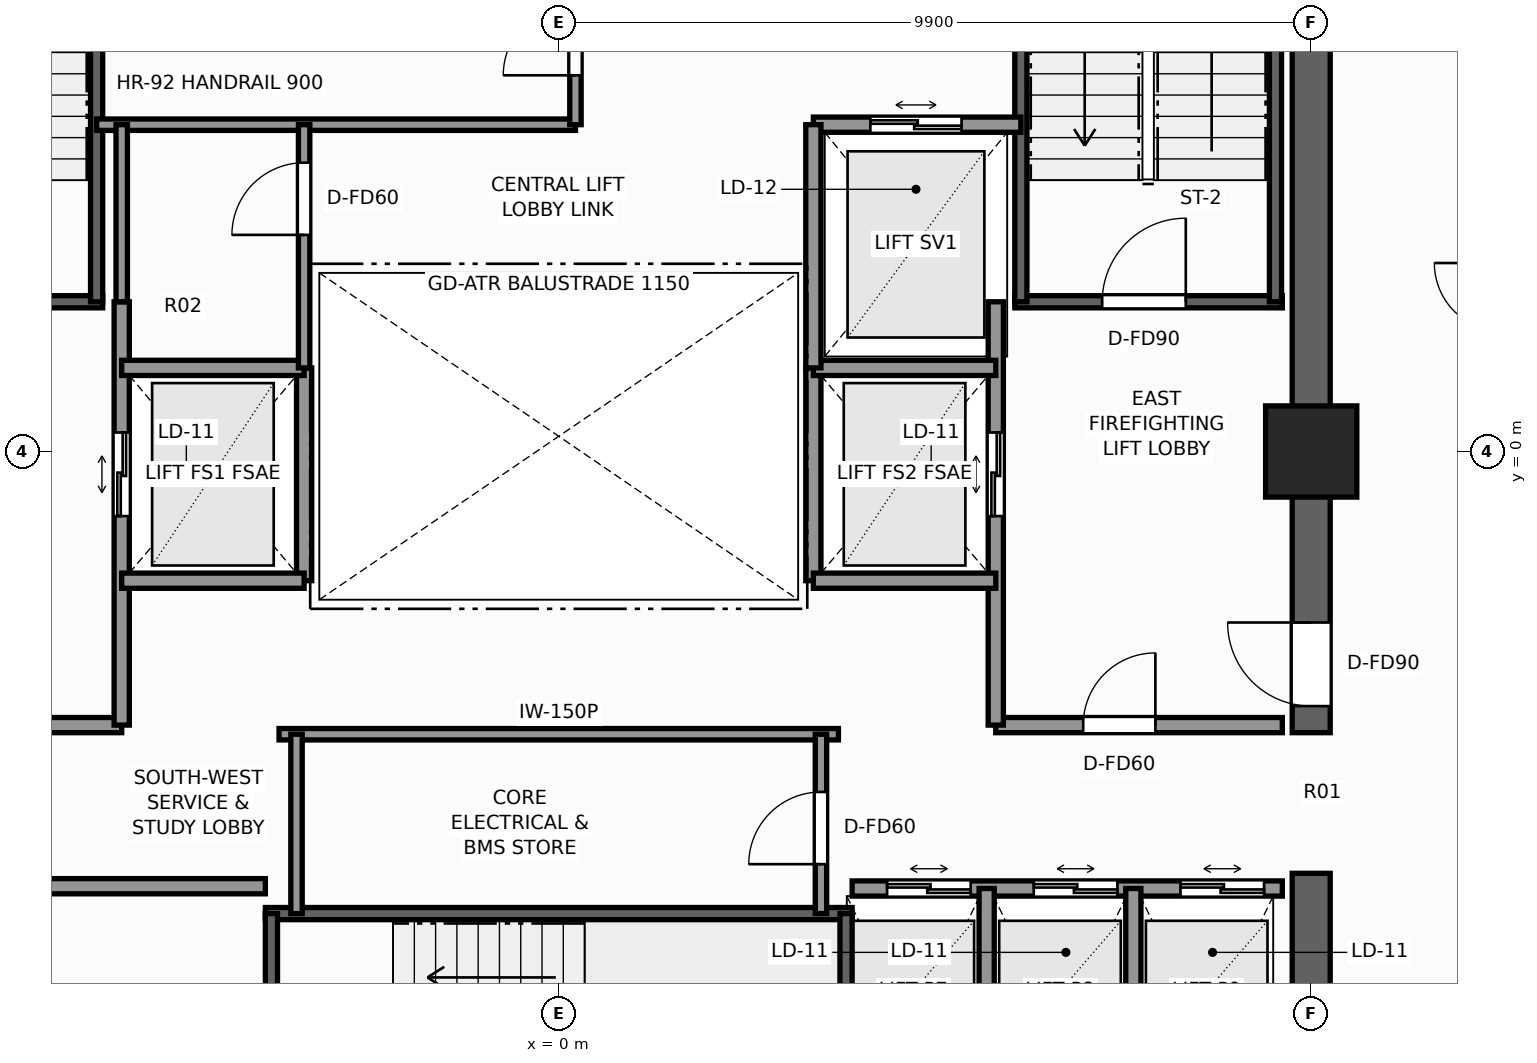
"""IFC4 building model, lengths in metres.
Left out: names, types, materials, properties, quantities, classifications, styles, units other than length and angle.
Written with IfcOpenShell. Run it as: python <this file> out.ifc"""

import sys

from ifc_helpers import new_model, si_unit, direction, frame, frame_2d, origin, origin_2d, place, context, subcontext, project, spatial, rectangle, extrude, element, fill, save


model = new_model("IFC4")
c1 = context("Model", 3, precision=1e-05, world=origin(), true_north=direction((0.0, 1.0)))
c2 = subcontext(c1, "Body", "Model", "MODEL_VIEW")
j1 = project(units=[si_unit("LENGTHUNIT", "METRE"), si_unit("PLANEANGLEUNIT", "RADIAN")], contexts=[c1])
p1 = place(None, origin())
s1 = spatial("IfcSite", under=j1, at=p1, CompositionType="ELEMENT")
p2 = place(p1, origin())
s2 = spatial("IfcBuilding", under=s1, at=p2, CompositionType="ELEMENT")
p3 = place(p2, frame((0.0, 0.0, 163.5)))
s3 = spatial("IfcBuildingStorey", under=s2, at=p3, CompositionType="ELEMENT", Elevation=163.5)
p4 = place(p3, frame((9.9, -9.65, 0.0), z_axis=(0.0, 0.0, 1.0), x_axis=(0.0, 1.0, 0.0)))
e1 = element("IfcWall", 1, at=p4, inside=s3, PredefinedType="SHEAR", context=c2, shape_type="SweptSolid", body=[
    extrude(rectangle(XDim=4.1, YDim=0.5, at=frame_2d((2.05, 0.0))), origin(), (0.0, 0.0, 1.0), 3.3),
])
p5 = place(p3, frame((9.9, -3.7, 0.0), z_axis=(0.0, 0.0, 1.0), x_axis=(0.0, 1.0, 0.0)))
e2 = element("IfcWall", 2, at=p5, inside=s3, PredefinedType="SHEAR", context=c2, shape_type="SweptSolid", body=[
    extrude(rectangle(XDim=13.35, YDim=0.5, at=frame_2d((6.675, 0.0))), origin(), (0.0, 0.0, 1.0), 3.3),
])
p6 = place(p5, frame((0.35, 0.0, 0.0)))
e3 = element("IfcOpeningElement", 3, at=p6, cuts=e2, PredefinedType="OPENING", context=c2, shape_type="SweptSolid", body=[
    extrude(rectangle(XDim=1.1, YDim=2.2, at=frame_2d((0.55, 1.1))), frame((0.0, 0.26, 0.0), z_axis=(0.0, -1.0, 0.0), x_axis=(1.0, 0.0, 0.0)), (0.0, 0.0, 1.0), 0.52),
])
p7 = place(p3, frame((9.9, 0.0, 0.0), z_axis=(0.0, 0.0, 1.0), x_axis=(1.0, 0.0, 0.0)))
e4 = element("IfcColumn", 4, at=p7, inside=s3, PredefinedType="COLUMN", context=c2, shape_type="SweptSolid", body=[
    extrude(rectangle(XDim=1.2, YDim=1.2, at=origin_2d()), origin(), (0.0, 0.0, 1.0), 3.3),
])
p8 = place(p3, frame((-9.52, 1.97, 0.0), z_axis=(0.0, 0.0, 1.0), x_axis=(1.0, 0.0, 0.0)))
e5 = element("IfcWall", 5, at=p8, inside=s3, PredefinedType="SHEAR", context=c2, shape_type="SweptSolid", body=[
    extrude(rectangle(XDim=3.52, YDim=0.16, at=frame_2d((1.76, 0.0))), origin(), (0.0, 0.0, 1.0), 3.3),
])
p9 = place(p8, frame((1.15, 0.0, 0.0)))
e6 = element("IfcOpeningElement", 6, at=p9, cuts=e5, PredefinedType="OPENING", context=c2, shape_type="SweptSolid", body=[
    extrude(rectangle(XDim=1.1, YDim=2.2, at=frame_2d((0.55, 1.1))), frame((0.0, 0.09, 0.0), z_axis=(0.0, -1.0, 0.0), x_axis=(1.0, 0.0, 0.0)), (0.0, 0.0, 1.0), 0.18),
])
p10 = place(p3, frame((-6.08, 1.97, 0.0), z_axis=(0.0, 0.0, 1.0), x_axis=(0.0, 1.0, 0.0)))
e7 = element("IfcWall", 7, at=p10, inside=s3, PredefinedType="SHEAR", context=c2, shape_type="SweptSolid", body=[
    extrude(rectangle(XDim=7.56, YDim=0.16, at=frame_2d((3.78, 0.0))), origin(), (0.0, 0.0, 1.0), 3.3),
])
p11 = place(p3, frame((6.0, 1.97, 0.0), z_axis=(0.0, 0.0, 1.0), x_axis=(1.0, 0.0, 0.0)))
e8 = element("IfcWall", 8, at=p11, inside=s3, PredefinedType="SHEAR", context=c2, shape_type="SweptSolid", body=[
    extrude(rectangle(XDim=3.52, YDim=0.16, at=frame_2d((1.76, 0.0))), origin(), (0.0, 0.0, 1.0), 3.3),
])
p12 = place(p11, frame((1.15, 0.0, 0.0)))
e9 = element("IfcOpeningElement", 9, at=p12, cuts=e8, PredefinedType="OPENING", context=c2, shape_type="SweptSolid", body=[
    extrude(rectangle(XDim=1.1, YDim=2.2, at=frame_2d((0.55, 1.1))), frame((0.0, 0.09, 0.0), z_axis=(0.0, -1.0, 0.0), x_axis=(1.0, 0.0, 0.0)), (0.0, 0.0, 1.0), 0.18),
])
for number, where, z_axis, x_axis in (
    (10, (6.08, 1.97, 0.0), (0.0, 0.0, 1.0), (0.0, 1.0, 0.0)),
    (11, (9.43, 1.97, 0.0), (0.0, 0.0, 1.0), (0.0, 1.0, 0.0)),
):
    element("IfcWall", number, at=place(p3, frame(where, z_axis=z_axis, x_axis=x_axis)), inside=s3, PredefinedType="SHEAR", context=c2, shape_type="SweptSolid", body=[
        extrude(rectangle(XDim=7.56, YDim=0.16, at=frame_2d((3.78, 0.0))), origin(), (0.0, 0.0, 1.0), 3.3),
    ])
p13 = place(p3, frame((-3.86, -6.08, 0.0), z_axis=(0.0, 0.0, 1.0), x_axis=(1.0, 0.0, 0.0)))
e12 = element("IfcWall", 12, at=p13, inside=s3, PredefinedType="SHEAR", context=c2, shape_type="SweptSolid", body=[
    extrude(rectangle(XDim=7.72, YDim=0.16, at=frame_2d((3.86, 0.0))), origin(), (0.0, 0.0, 1.0), 3.3),
])
for number, where, z_axis, x_axis in (
    (13, (-3.78, -9.43, 0.0), (0.0, 0.0, 1.0), (0.0, 1.0, 0.0)),
    (14, (3.78, -9.43, 0.0), (0.0, 0.0, 1.0), (0.0, 1.0, 0.0)),
):
    element("IfcWall", number, at=place(p3, frame(where, z_axis=z_axis, x_axis=x_axis)), inside=s3, PredefinedType="SHEAR", context=c2, shape_type="SweptSolid", body=[
        extrude(rectangle(XDim=3.35, YDim=0.16, at=frame_2d((1.675, 0.0))), origin(), (0.0, 0.0, 1.0), 3.3),
    ])
p14 = place(p3, frame((-9.52, -3.6, 0.0), z_axis=(0.0, 0.0, 1.0), x_axis=(1.0, 0.0, 0.0)))
e15 = element("IfcWall", 15, at=p14, inside=s3, PredefinedType="SOLIDWALL", context=c2, shape_type="SweptSolid", body=[
    extrude(rectangle(XDim=3.77, YDim=0.2, at=frame_2d((1.885, 0.0))), origin(), (0.0, 0.0, 1.0), 3.1),
])
p15 = place(p14, frame((1.15, 0.0, 0.0)))
e16 = element("IfcOpeningElement", 16, at=p15, cuts=e15, PredefinedType="OPENING", context=c2, shape_type="SweptSolid", body=[
    extrude(rectangle(XDim=0.95, YDim=2.06, at=frame_2d((0.475, 1.03))), frame((0.0, 0.11, 0.0), z_axis=(0.0, -1.0, 0.0), x_axis=(1.0, 0.0, 0.0)), (0.0, 0.0, 1.0), 0.22),
])
p16 = place(p3, frame((-5.75, -3.6, 0.0), z_axis=(0.0, 0.0, 1.0), x_axis=(0.0, 1.0, 0.0)))
e17 = element("IfcWall", 17, at=p16, inside=s3, PredefinedType="SOLIDWALL", context=c2, shape_type="SweptSolid", body=[
    extrude(rectangle(XDim=5.57, YDim=0.2, at=frame_2d((2.785, 0.0))), origin(), (0.0, 0.0, 1.0), 2.735),
])
p17 = place(p16, frame((2.75, 0.0, 0.0)))
e18 = element("IfcOpeningElement", 18, at=p17, cuts=e17, PredefinedType="OPENING", context=c2, shape_type="SweptSolid", body=[
    extrude(rectangle(XDim=1.1, YDim=2.2, at=frame_2d((0.55, 1.1))), frame((0.0, 0.11, 0.0), z_axis=(0.0, -1.0, 0.0), x_axis=(1.0, 0.0, 0.0)), (0.0, 0.0, 1.0), 0.22),
])
p18 = place(p3, frame((-3.35, -1.7, 0.0), z_axis=(0.0, 0.0, 1.0), x_axis=(0.0, 1.0, 0.0)))
e19 = element("IfcWall", 19, at=p18, inside=s3, PredefinedType="SOLIDWALL", context=c2, shape_type="SweptSolid", body=[
    extrude(rectangle(XDim=2.8, YDim=0.2, at=frame_2d((1.4, 0.0))), origin(), (0.0, 0.0, 1.0), 2.735),
])
for number, where, z_axis, x_axis in (
    (20, (-5.75, -1.7, 0.0), (0.0, 0.0, 1.0), (1.0, 0.0, 0.0)),
    (21, (-5.75, 1.1, 0.0), (0.0, 0.0, 1.0), (1.0, 0.0, 0.0)),
):
    element("IfcWall", number, at=place(p3, frame(where, z_axis=z_axis, x_axis=x_axis)), inside=s3, PredefinedType="SOLIDWALL", context=c2, shape_type="SweptSolid", body=[
        extrude(rectangle(XDim=2.4, YDim=0.2, at=frame_2d((1.2, 0.0))), origin(), (0.0, 0.0, 1.0), 3.1),
    ])
p19 = place(p3, frame((5.75, -3.6, 0.0), z_axis=(0.0, 0.0, 1.0), x_axis=(1.0, 0.0, 0.0)))
e22 = element("IfcWall", 22, at=p19, inside=s3, PredefinedType="SOLIDWALL", context=c2, shape_type="SweptSolid", body=[
    extrude(rectangle(XDim=3.77, YDim=0.2, at=frame_2d((1.885, 0.0))), origin(), (0.0, 0.0, 1.0), 3.1),
])
p20 = place(p19, frame((1.15, 0.0, 0.0)))
e23 = element("IfcOpeningElement", 23, at=p20, cuts=e22, PredefinedType="OPENING", context=c2, shape_type="SweptSolid", body=[
    extrude(rectangle(XDim=0.95, YDim=2.06, at=frame_2d((0.475, 1.03))), frame((0.0, 0.11, 0.0), z_axis=(0.0, -1.0, 0.0), x_axis=(1.0, 0.0, 0.0)), (0.0, 0.0, 1.0), 0.22),
])
p21 = place(p3, frame((5.75, -3.6, 0.0), z_axis=(0.0, 0.0, 1.0), x_axis=(0.0, 1.0, 0.0)))
e24 = element("IfcWall", 24, at=p21, inside=s3, PredefinedType="SOLIDWALL", context=c2, shape_type="SweptSolid", body=[
    extrude(rectangle(XDim=5.57, YDim=0.2, at=frame_2d((2.785, 0.0))), origin(), (0.0, 0.0, 1.0), 2.735),
])
p22 = place(p21, frame((2.75, 0.0, 0.0)))
e25 = element("IfcOpeningElement", 25, at=p22, cuts=e24, PredefinedType="OPENING", context=c2, shape_type="SweptSolid", body=[
    extrude(rectangle(XDim=1.1, YDim=2.2, at=frame_2d((0.55, 1.1))), frame((0.0, 0.11, 0.0), z_axis=(0.0, -1.0, 0.0), x_axis=(1.0, 0.0, 0.0)), (0.0, 0.0, 1.0), 0.22),
])
p23 = place(p3, frame((3.35, -1.7, 0.0), z_axis=(0.0, 0.0, 1.0), x_axis=(0.0, 1.0, 0.0)))
e26 = element("IfcWall", 26, at=p23, inside=s3, PredefinedType="SOLIDWALL", context=c2, shape_type="SweptSolid", body=[
    extrude(rectangle(XDim=2.8, YDim=0.2, at=frame_2d((1.4, 0.0))), origin(), (0.0, 0.0, 1.0), 2.735),
])
for number, where, z_axis, x_axis in (
    (27, (3.35, -1.7, 0.0), (0.0, 0.0, 1.0), (1.0, 0.0, 0.0)),
    (28, (3.35, 1.1, 0.0), (0.0, 0.0, 1.0), (1.0, 0.0, 0.0)),
):
    element("IfcWall", number, at=place(p3, frame(where, z_axis=z_axis, x_axis=x_axis)), inside=s3, PredefinedType="SOLIDWALL", context=c2, shape_type="SweptSolid", body=[
        extrude(rectangle(XDim=2.4, YDim=0.2, at=frame_2d((1.2, 0.0))), origin(), (0.0, 0.0, 1.0), 3.1),
    ])
p24 = place(p3, frame((3.35, 4.3, 0.0), z_axis=(0.0, 0.0, 1.0), x_axis=(1.0, 0.0, 0.0)))
e29 = element("IfcWall", 29, at=p24, inside=s3, PredefinedType="SOLIDWALL", context=c2, shape_type="SweptSolid", body=[
    extrude(rectangle(XDim=2.73, YDim=0.2, at=frame_2d((1.365, 0.0))), origin(), (0.0, 0.0, 1.0), 3.1),
])
p25 = place(p24, frame((0.75, 0.0, 0.0)))
e30 = element("IfcOpeningElement", 30, at=p25, cuts=e29, PredefinedType="OPENING", context=c2, shape_type="SweptSolid", body=[
    extrude(rectangle(XDim=1.2, YDim=2.25, at=frame_2d((0.6, 1.125))), frame((0.0, 0.11, 0.0), z_axis=(0.0, -1.0, 0.0), x_axis=(1.0, 0.0, 0.0)), (0.0, 0.0, 1.0), 0.22),
])
p26 = place(p3, frame((3.35, 1.1, 0.0), z_axis=(0.0, 0.0, 1.0), x_axis=(0.0, 1.0, 0.0)))
e31 = element("IfcWall", 31, at=p26, inside=s3, PredefinedType="SOLIDWALL", context=c2, shape_type="SweptSolid", body=[
    extrude(rectangle(XDim=3.2, YDim=0.2, at=frame_2d((1.6, 0.0))), origin(), (0.0, 0.0, 1.0), 2.735),
])
p27 = place(p3, frame((-6.08, 4.3, 0.0), z_axis=(0.0, 0.0, 1.0), x_axis=(1.0, 0.0, 0.0)))
e32 = element("IfcWall", 32, at=p27, inside=s3, PredefinedType="PARTITIONING", context=c2, shape_type="SweptSolid", body=[
    extrude(rectangle(XDim=6.3, YDim=0.15, at=frame_2d((3.15, 0.0))), origin(), (0.0, 0.0, 1.0), 3.1),
])
p28 = place(p3, frame((0.22, 4.3, 0.0), z_axis=(0.0, 0.0, 1.0), x_axis=(0.0, 1.0, 0.0)))
e33 = element("IfcWall", 33, at=p28, inside=s3, PredefinedType="PARTITIONING", context=c2, shape_type="SweptSolid", body=[
    extrude(rectangle(XDim=5.22, YDim=0.15, at=frame_2d((2.61, 0.0))), origin(), (0.0, 0.0, 1.0), 3.1),
])
p29 = place(p28, frame((0.65, 0.0, 0.0)))
e34 = element("IfcOpeningElement", 34, at=p29, cuts=e33, PredefinedType="OPENING", context=c2, shape_type="SweptSolid", body=[
    extrude(rectangle(XDim=0.95, YDim=2.06, at=frame_2d((0.475, 1.03))), frame((0.0, 0.085, 0.0), z_axis=(0.0, -1.0, 0.0), x_axis=(1.0, 0.0, 0.0)), (0.0, 0.0, 1.0), 0.17),
])
p30 = place(p3, frame((-9.52, -5.72, 0.0), z_axis=(0.0, 0.0, 1.0), x_axis=(1.0, 0.0, 0.0)))
e35 = element("IfcWall", 35, at=p30, inside=s3, PredefinedType="SOLIDWALL", context=c2, shape_type="SweptSolid", body=[
    extrude(rectangle(XDim=5.66, YDim=0.2, at=frame_2d((2.83, 0.0))), origin(), (0.0, 0.0, 1.0), 3.1),
])
p31 = place(p30, frame((1.8, 0.0, 0.0)))
e36 = element("IfcOpeningElement", 36, at=p31, cuts=e35, PredefinedType="OPENING", context=c2, shape_type="SweptSolid", body=[
    extrude(rectangle(XDim=0.95, YDim=2.06, at=frame_2d((0.475, 1.03))), frame((0.0, 0.11, 0.0), z_axis=(0.0, -1.0, 0.0), x_axis=(1.0, 0.0, 0.0)), (0.0, 0.0, 1.0), 0.22),
])
p32 = place(p3, frame((3.86, -5.75, 0.0), z_axis=(0.0, 0.0, 1.0), x_axis=(1.0, 0.0, 0.0)))
e37 = element("IfcWall", 37, at=p32, inside=s3, PredefinedType="SOLIDWALL", context=c2, shape_type="SweptSolid", body=[
    extrude(rectangle(XDim=5.66, YDim=0.2, at=frame_2d((2.83, 0.0))), origin(), (0.0, 0.0, 1.0), 3.1),
])
p33 = place(p32, frame((0.46, 0.0, 0.0)))
e38 = element("IfcOpeningElement", 38, at=p33, cuts=e37, PredefinedType="OPENING", context=c2, shape_type="SweptSolid", body=[
    extrude(rectangle(XDim=1.1, YDim=2.2, at=frame_2d((0.55, 1.1))), frame((0.0, 0.11, 0.0), z_axis=(0.0, -1.0, 0.0), x_axis=(1.0, 0.0, 0.0)), (0.0, 0.0, 1.0), 0.22),
])
p34 = place(p32, frame((2.39, 0.0, 0.0)))
e39 = element("IfcOpeningElement", 39, at=p34, cuts=e37, PredefinedType="OPENING", context=c2, shape_type="SweptSolid", body=[
    extrude(rectangle(XDim=1.1, YDim=2.2, at=frame_2d((0.55, 1.1))), frame((0.0, 0.11, 0.0), z_axis=(0.0, -1.0, 0.0), x_axis=(1.0, 0.0, 0.0)), (0.0, 0.0, 1.0), 0.22),
])
p35 = place(p32, frame((4.32, 0.0, 0.0)))
e40 = element("IfcOpeningElement", 40, at=p35, cuts=e37, PredefinedType="OPENING", context=c2, shape_type="SweptSolid", body=[
    extrude(rectangle(XDim=1.1, YDim=2.2, at=frame_2d((0.55, 1.1))), frame((0.0, 0.11, 0.0), z_axis=(0.0, -1.0, 0.0), x_axis=(1.0, 0.0, 0.0)), (0.0, 0.0, 1.0), 0.22),
])
for number, where, z_axis, x_axis in (
    (41, (5.63, -9.52, 0.0), (0.0, 0.0, 1.0), (0.0, 1.0, 0.0)),
    (42, (7.56, -9.52, 0.0), (0.0, 0.0, 1.0), (0.0, 1.0, 0.0)),
):
    element("IfcWall", number, at=place(p3, frame(where, z_axis=z_axis, x_axis=x_axis)), inside=s3, PredefinedType="SOLIDWALL", context=c2, shape_type="SweptSolid", body=[
        extrude(rectangle(XDim=3.77, YDim=0.2, at=frame_2d((1.885, 0.0))), origin(), (0.0, 0.0, 1.0), 3.1),
    ])
p36 = place(p3, frame((-3.68, -3.72, 0.0), z_axis=(0.0, 0.0, 1.0), x_axis=(1.0, 0.0, 0.0)))
e43 = element("IfcWall", 43, at=p36, inside=s3, PredefinedType="PARTITIONING", context=c2, shape_type="SweptSolid", body=[
    extrude(rectangle(XDim=7.36, YDim=0.15, at=frame_2d((3.68, 0.0))), origin(), (0.0, 0.0, 1.0), 3.1),
])
p37 = place(p3, frame((3.45, -6.08, 0.0), z_axis=(0.0, 0.0, 1.0), x_axis=(0.0, 1.0, 0.0)))
e44 = element("IfcWall", 44, at=p37, inside=s3, PredefinedType="PARTITIONING", context=c2, shape_type="SweptSolid", body=[
    extrude(rectangle(XDim=2.36, YDim=0.15, at=frame_2d((1.18, 0.0))), origin(), (0.0, 0.0, 1.0), 3.1),
])
p38 = place(p37, frame((0.65, 0.0, 0.0)))
e45 = element("IfcOpeningElement", 45, at=p38, cuts=e44, PredefinedType="OPENING", context=c2, shape_type="SweptSolid", body=[
    extrude(rectangle(XDim=0.95, YDim=2.06, at=frame_2d((0.475, 1.03))), frame((0.0, 0.085, 0.0), z_axis=(0.0, -1.0, 0.0), x_axis=(1.0, 0.0, 0.0)), (0.0, 0.0, 1.0), 0.17),
])
p39 = place(p3, frame((-3.45, -6.08, 0.0), z_axis=(0.0, 0.0, 1.0), x_axis=(0.0, 1.0, 0.0)))
e46 = element("IfcWall", 46, at=p39, inside=s3, PredefinedType="PARTITIONING", context=c2, shape_type="SweptSolid", body=[
    extrude(rectangle(XDim=2.36, YDim=0.15, at=frame_2d((1.18, 0.0))), origin(), (0.0, 0.0, 1.0), 3.1),
])
p40 = place(p3, frame((-3.35, 1.1, 0.0), z_axis=(0.0, 0.0, 1.0), x_axis=(0.0, 1.0, 0.0)))
e47 = element("IfcWall", 47, at=p40, inside=s3, PredefinedType="PARTITIONING", context=c2, shape_type="SweptSolid", body=[
    extrude(rectangle(XDim=3.2, YDim=0.15, at=frame_2d((1.6, 0.0))), origin(), (0.0, 0.0, 1.0), 2.735),
])
p41 = place(p40, frame((1.75, 0.0, 0.0)))
e48 = element("IfcOpeningElement", 48, at=p41, cuts=e47, PredefinedType="OPENING", context=c2, shape_type="SweptSolid", body=[
    extrude(rectangle(XDim=0.95, YDim=2.06, at=frame_2d((0.475, 1.03))), frame((0.0, 0.085, 0.0), z_axis=(0.0, -1.0, 0.0), x_axis=(1.0, 0.0, 0.0)), (0.0, 0.0, 1.0), 0.17),
])
p42 = place(p3, frame((-5.75, 1.97, 0.0), z_axis=(0.0, 0.0, 1.0), x_axis=(0.0, 1.0, 0.0)))
e49 = element("IfcWall", 49, at=p42, inside=s3, PredefinedType="PARTITIONING", context=c2, shape_type="SweptSolid", body=[
    extrude(rectangle(XDim=2.33, YDim=0.15, at=frame_2d((1.165, 0.0))), origin(), (0.0, 0.0, 1.0), 2.735),
])
p43 = place(p12, origin())
e50 = element("IfcDoor", 50, at=p43, inside=s3, OperationType="SINGLE_SWING_RIGHT", PredefinedType="DOOR", context=c2, shape_type="SweptSolid", body=[
    extrude(rectangle(XDim=1.1, YDim=2.2, at=frame_2d((0.55, 1.1))), frame((0.0, 0.025, 0.0), z_axis=(0.0, -1.0, 0.0), x_axis=(1.0, 0.0, 0.0)), (0.0, 0.0, 1.0), 0.05),
])
fill(e9, e50)
p44 = place(p17, origin())
e51 = element("IfcDoor", 51, at=p44, inside=s3, OperationType="DOUBLE_DOOR_SLIDING", PredefinedType="DOOR", context=c2, shape_type="SweptSolid", body=[
    extrude(rectangle(XDim=1.1, YDim=2.2, at=frame_2d((0.55, 1.1))), frame((0.0, 0.025, 0.0), z_axis=(0.0, -1.0, 0.0), x_axis=(1.0, 0.0, 0.0)), (0.0, 0.0, 1.0), 0.05),
])
fill(e18, e51)
p45 = place(p6, origin())
e52 = element("IfcDoor", 52, at=p45, inside=s3, OperationType="SINGLE_SWING_RIGHT", PredefinedType="DOOR", context=c2, shape_type="SweptSolid", body=[
    extrude(rectangle(XDim=1.1, YDim=2.2, at=frame_2d((0.55, 1.1))), frame((0.0, 0.025, 0.0), z_axis=(0.0, -1.0, 0.0), x_axis=(1.0, 0.0, 0.0)), (0.0, 0.0, 1.0), 0.05),
])
fill(e3, e52)
p46 = place(p22, origin())
e53 = element("IfcDoor", 53, at=p46, inside=s3, OperationType="DOUBLE_DOOR_SLIDING", PredefinedType="DOOR", context=c2, shape_type="SweptSolid", body=[
    extrude(rectangle(XDim=1.1, YDim=2.2, at=frame_2d((0.55, 1.1))), frame((0.0, 0.025, 0.0), z_axis=(0.0, -1.0, 0.0), x_axis=(1.0, 0.0, 0.0)), (0.0, 0.0, 1.0), 0.05),
])
fill(e25, e53)
p47 = place(p25, origin())
e54 = element("IfcDoor", 54, at=p47, inside=s3, OperationType="DOUBLE_DOOR_SLIDING", PredefinedType="DOOR", context=c2, shape_type="SweptSolid", body=[
    extrude(rectangle(XDim=1.2, YDim=2.25, at=frame_2d((0.6, 1.125))), frame((0.0, 0.025, 0.0), z_axis=(0.0, -1.0, 0.0), x_axis=(1.0, 0.0, 0.0)), (0.0, 0.0, 1.0), 0.05),
])
fill(e30, e54)
p48 = place(p29, origin())
e55 = element("IfcDoor", 55, at=p48, inside=s3, OperationType="SINGLE_SWING_LEFT", PredefinedType="DOOR", context=c2, shape_type="SweptSolid", body=[
    extrude(rectangle(XDim=0.95, YDim=2.06, at=frame_2d((0.475, 1.03))), frame((0.0, 0.025, 0.0), z_axis=(0.0, -1.0, 0.0), x_axis=(1.0, 0.0, 0.0)), (0.0, 0.0, 1.0), 0.05),
])
fill(e34, e55)
p49 = place(p33, origin())
e56 = element("IfcDoor", 56, at=p49, inside=s3, OperationType="DOUBLE_DOOR_SLIDING", PredefinedType="DOOR", context=c2, shape_type="SweptSolid", body=[
    extrude(rectangle(XDim=1.1, YDim=2.2, at=frame_2d((0.55, 1.1))), frame((0.0, 0.025, 0.0), z_axis=(0.0, -1.0, 0.0), x_axis=(1.0, 0.0, 0.0)), (0.0, 0.0, 1.0), 0.05),
])
fill(e38, e56)
p50 = place(p34, origin())
e57 = element("IfcDoor", 57, at=p50, inside=s3, OperationType="DOUBLE_DOOR_SLIDING", PredefinedType="DOOR", context=c2, shape_type="SweptSolid", body=[
    extrude(rectangle(XDim=1.1, YDim=2.2, at=frame_2d((0.55, 1.1))), frame((0.0, 0.025, 0.0), z_axis=(0.0, -1.0, 0.0), x_axis=(1.0, 0.0, 0.0)), (0.0, 0.0, 1.0), 0.05),
])
fill(e39, e57)
p51 = place(p35, origin())
e58 = element("IfcDoor", 58, at=p51, inside=s3, OperationType="DOUBLE_DOOR_SLIDING", PredefinedType="DOOR", context=c2, shape_type="SweptSolid", body=[
    extrude(rectangle(XDim=1.1, YDim=2.2, at=frame_2d((0.55, 1.1))), frame((0.0, 0.025, 0.0), z_axis=(0.0, -1.0, 0.0), x_axis=(1.0, 0.0, 0.0)), (0.0, 0.0, 1.0), 0.05),
])
fill(e40, e58)
p52 = place(p20, origin())
e59 = element("IfcDoor", 59, at=p52, inside=s3, OperationType="SINGLE_SWING_RIGHT", PredefinedType="DOOR", context=c2, shape_type="SweptSolid", body=[
    extrude(rectangle(XDim=0.95, YDim=2.06, at=frame_2d((0.475, 1.03))), frame((0.0, 0.025, 0.0), z_axis=(0.0, -1.0, 0.0), x_axis=(1.0, 0.0, 0.0)), (0.0, 0.0, 1.0), 0.05),
])
fill(e23, e59)
p53 = place(p38, origin())
e60 = element("IfcDoor", 60, at=p53, inside=s3, OperationType="SINGLE_SWING_LEFT", PredefinedType="DOOR", context=c2, shape_type="SweptSolid", body=[
    extrude(rectangle(XDim=0.95, YDim=2.06, at=frame_2d((0.475, 1.03))), frame((0.0, 0.025, 0.0), z_axis=(0.0, -1.0, 0.0), x_axis=(1.0, 0.0, 0.0)), (0.0, 0.0, 1.0), 0.05),
])
fill(e45, e60)
p54 = place(p41, origin())
e61 = element("IfcDoor", 61, at=p54, inside=s3, OperationType="SINGLE_SWING_LEFT", PredefinedType="DOOR", context=c2, shape_type="SweptSolid", body=[
    extrude(rectangle(XDim=0.95, YDim=2.06, at=frame_2d((0.475, 1.03))), frame((0.0, 0.025, 0.0), z_axis=(0.0, -1.0, 0.0), x_axis=(1.0, 0.0, 0.0)), (0.0, 0.0, 1.0), 0.05),
])
fill(e48, e61)
save(model, sys.argv[1])
